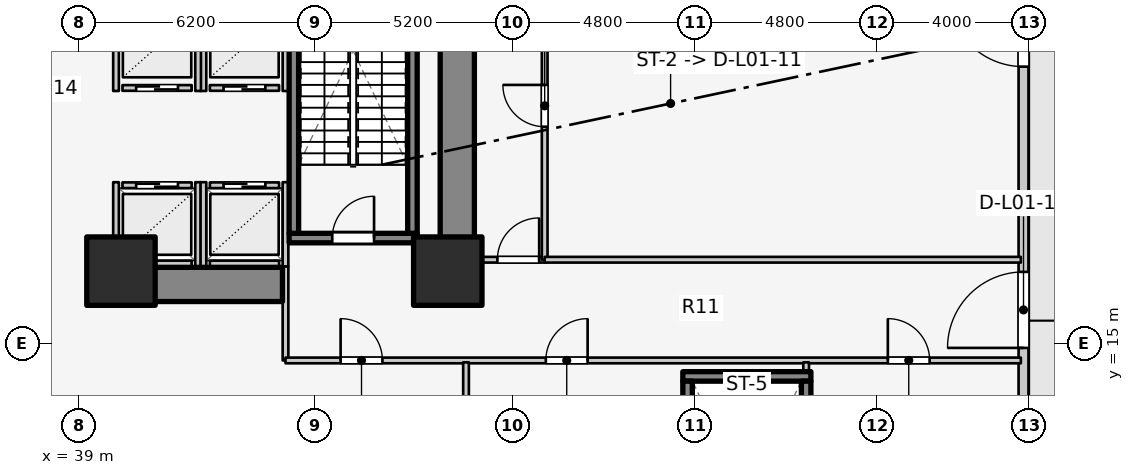
"""IFC4 building model, lengths in metres.
Left out: names, types, materials, properties, quantities, classifications, styles, units other than length and angle.
Written with IfcOpenShell. Run it as: python <this file> out.ifc"""

import sys

from ifc_helpers import new_model, si_unit, direction, frame, frame_2d, origin, origin_2d, place, context, subcontext, project, spatial, rectangle, extrude, element, fill, save


model = new_model("IFC4")
c1 = context("Model", 3, precision=1e-05, world=origin(), true_north=direction((0.0, 1.0)))
c2 = subcontext(c1, "Body", "Model", "MODEL_VIEW")
j1 = project(units=[si_unit("LENGTHUNIT", "METRE"), si_unit("PLANEANGLEUNIT", "RADIAN")], contexts=[c1])
p1 = place(None, origin())
s1 = spatial("IfcSite", under=j1, at=p1, CompositionType="ELEMENT")
p2 = place(p1, origin())
s2 = spatial("IfcBuilding", under=s1, at=p2, CompositionType="ELEMENT")
p3 = place(p2, origin())
s3 = spatial("IfcBuildingStorey", under=s2, at=p3, CompositionType="ELEMENT", Elevation=0.0)
p4 = place(p3, frame((48.95, 17.05, 0.0), z_axis=(0.0, 0.0, 1.0), x_axis=(0.0, 1.0, 0.0)))
e1 = element("IfcWall", 1, at=p4, inside=s3, PredefinedType="SHEAR", context=c2, shape_type="SweptSolid", body=[
    extrude(rectangle(XDim=12.8, YDim=0.9, at=frame_2d((6.4, 0.0))), origin(), (0.0, 0.0, 1.0), 4.6),
])
p5 = place(p3, frame((39.85, 16.55, 0.0), z_axis=(0.0, 0.0, 1.0), x_axis=(1.0, 0.0, 0.0)))
e2 = element("IfcWall", 2, at=p5, inside=s3, PredefinedType="SHEAR", context=c2, shape_type="SweptSolid", body=[
    extrude(rectangle(XDim=4.5, YDim=0.9, at=frame_2d((2.25, 0.0))), origin(), (0.0, 0.0, 1.0), 4.6),
])
p6 = place(p3, frame((44.525, 17.77, 0.0), z_axis=(0.0, 0.0, 1.0), x_axis=(1.0, 0.0, 0.0)))
e3 = element("IfcWall", 3, at=p6, inside=s3, PredefinedType="SOLIDWALL", context=c2, shape_type="SweptSolid", body=[
    extrude(rectangle(XDim=3.37, YDim=0.25, at=frame_2d((1.685, 0.0))), origin(), (0.0, 0.0, 1.0), 4.6),
])
p7 = place(p6, frame((1.135, 0.0, 0.0)))
e4 = element("IfcOpeningElement", 4, at=p7, cuts=e3, PredefinedType="OPENING", context=c2, shape_type="SweptSolid", body=[
    extrude(rectangle(XDim=1.1, YDim=2.1, at=frame_2d((0.55, 1.05))), frame((0.0, 0.135, 0.0), z_axis=(0.0, -1.0, 0.0), x_axis=(1.0, 0.0, 0.0)), (0.0, 0.0, 1.0), 0.27),
])
for number, where, z_axis, x_axis in (
    (5, (44.65, 17.895, 0.0), (0.0, 0.0, 1.0), (0.0, 1.0, 0.0)),
    (6, (47.77, 17.895, 0.0), (0.0, 0.0, 1.0), (0.0, 1.0, 0.0)),
):
    element("IfcWall", number, at=place(p3, frame(where, z_axis=z_axis, x_axis=x_axis)), inside=s3, PredefinedType="SOLIDWALL", context=c2, shape_type="SweptSolid", body=[
        extrude(rectangle(XDim=7.81, YDim=0.25, at=frame_2d((3.905, 0.0))), origin(), (0.0, 0.0, 1.0), 4.6),
    ])
p8 = place(p3, frame((54.885, 14.13, 0.0), z_axis=(0.0, 0.0, 1.0), x_axis=(1.0, 0.0, 0.0)))
e7 = element("IfcWall", 7, at=p8, inside=s3, PredefinedType="SOLIDWALL", context=c2, shape_type="SweptSolid", body=[
    extrude(rectangle(XDim=3.37, YDim=0.25, at=frame_2d((1.685, 0.0))), origin(), (0.0, 0.0, 1.0), 4.6),
])
for number, where, z_axis, x_axis in (
    (8, (55.01, 6.195, 0.0), (0.0, 0.0, 1.0), (0.0, 1.0, 0.0)),
    (9, (58.13, 6.195, 0.0), (0.0, 0.0, 1.0), (0.0, 1.0, 0.0)),
):
    element("IfcWall", number, at=place(p3, frame(where, z_axis=z_axis, x_axis=x_axis)), inside=s3, PredefinedType="SOLIDWALL", context=c2, shape_type="SweptSolid", body=[
        extrude(rectangle(XDim=7.81, YDim=0.25, at=frame_2d((3.905, 0.0))), origin(), (0.0, 0.0, 1.0), 4.6),
    ])
for number, where, z_axis, x_axis in (
    (10, (40.1, 16.9, 0.0), (0.0, 0.0, 1.0), (1.0, 0.0, 0.0)),
    (11, (48.7, 16.9, 0.0), (0.0, 0.0, 1.0), (1.0, 0.0, 0.0)),
):
    element("IfcColumn", number, at=place(p3, frame(where, z_axis=z_axis, x_axis=x_axis)), inside=s3, PredefinedType="COLUMN", context=c2, shape_type="SweptSolid", body=[
        extrude(rectangle(XDim=1.8, YDim=1.8, at=origin_2d()), origin(), (0.0, 0.0, 1.0), 4.6),
    ])
p9 = place(p3, frame((63.85, 0.28, 0.0), z_axis=(0.0, 0.0, 1.0), x_axis=(0.0, 1.0, 0.0)))
e12 = element("IfcWall", 12, at=p9, inside=s3, PredefinedType="STANDARD", context=c2, shape_type="SweptSolid", body=[
    extrude(rectangle(XDim=45.44, YDim=0.26, at=frame_2d((22.72, 0.0))), origin(), (0.0, 0.0, 1.0), 4.28),
])
p10 = place(p9, frame((14.6, 0.0, 0.0)))
e13 = element("IfcOpeningElement", 13, at=p10, cuts=e12, PredefinedType="OPENING", context=c2, shape_type="SweptSolid", body=[
    extrude(rectangle(XDim=2.0, YDim=2.4, at=frame_2d((1.0, 1.2))), frame((0.0, 0.14, 0.0), z_axis=(0.0, -1.0, 0.0), x_axis=(1.0, 0.0, 0.0)), (0.0, 0.0, 1.0), 0.28),
])
p11 = place(p9, frame((22.0, 0.0, 0.0)))
e14 = element("IfcOpeningElement", 14, at=p11, cuts=e12, PredefinedType="OPENING", context=c2, shape_type="SweptSolid", body=[
    extrude(rectangle(XDim=2.0, YDim=2.4, at=frame_2d((1.0, 1.2))), frame((0.0, 0.14, 0.0), z_axis=(0.0, -1.0, 0.0), x_axis=(1.0, 0.0, 0.0)), (0.0, 0.0, 1.0), 0.28),
])
p12 = place(p9, frame((35.92, 0.0, 0.0)))
e15 = element("IfcOpeningElement", 15, at=p12, cuts=e12, PredefinedType="OPENING", context=c2, shape_type="SweptSolid", body=[
    extrude(rectangle(XDim=4.2, YDim=3.0, at=frame_2d((2.1, 1.5))), frame((0.0, 0.14, 0.0), z_axis=(0.0, -1.0, 0.0), x_axis=(1.0, 0.0, 0.0)), (0.0, 0.0, 1.0), 0.28),
])
p13 = place(p3, frame((40.14, 19.16, 0.0), z_axis=(0.0, 0.0, 1.0), x_axis=(1.0, 0.0, 0.0)))
e16 = element("IfcWall", 16, at=p13, inside=s3, PredefinedType="SOLIDWALL", context=c2, shape_type="SweptSolid", body=[
    extrude(rectangle(XDim=1.82, YDim=0.15, at=frame_2d((0.91, 0.0))), origin(), (0.0, 0.0, 1.0), 3.62),
])
p14 = place(p13, frame((0.36, 0.0, 0.0)))
e17 = element("IfcOpeningElement", 17, at=p14, cuts=e16, PredefinedType="OPENING", context=c2, shape_type="SweptSolid", body=[
    extrude(rectangle(XDim=1.1, YDim=2.1, at=frame_2d((0.55, 1.05))), frame((0.0, 0.085, 0.0), z_axis=(0.0, -1.0, 0.0), x_axis=(1.0, 0.0, 0.0)), (0.0, 0.0, 1.0), 0.17),
])
p15 = place(p3, frame((40.14, 17.1, 0.0), z_axis=(0.0, 0.0, 1.0), x_axis=(1.0, 0.0, 0.0)))
e18 = element("IfcWall", 18, at=p15, inside=s3, PredefinedType="SOLIDWALL", context=c2, shape_type="SweptSolid", body=[
    extrude(rectangle(XDim=1.82, YDim=0.15, at=frame_2d((0.91, 0.0))), origin(), (0.0, 0.0, 1.0), 3.62),
])
p16 = place(p3, frame((39.97, 17.02, 0.0), z_axis=(0.0, 0.0, 1.0), x_axis=(0.0, 1.0, 0.0)))
e19 = element("IfcWall", 19, at=p16, inside=s3, PredefinedType="SOLIDWALL", context=c2, shape_type="SweptSolid", body=[
    extrude(rectangle(XDim=2.22, YDim=0.15, at=frame_2d((1.11, 0.0))), origin(), (0.0, 0.0, 1.0), 3.3),
])
p17 = place(p3, frame((42.13, 17.02, 0.0), z_axis=(0.0, 0.0, 1.0), x_axis=(0.0, 1.0, 0.0)))
e20 = element("IfcWall", 20, at=p17, inside=s3, PredefinedType="SOLIDWALL", context=c2, shape_type="SweptSolid", body=[
    extrude(rectangle(XDim=2.22, YDim=0.15, at=frame_2d((1.11, 0.0))), origin(), (0.0, 0.0, 1.0), 4.255),
])
p18 = place(p3, frame((42.44, 19.16, 0.0), z_axis=(0.0, 0.0, 1.0), x_axis=(1.0, 0.0, 0.0)))
e21 = element("IfcWall", 21, at=p18, inside=s3, PredefinedType="SOLIDWALL", context=c2, shape_type="SweptSolid", body=[
    extrude(rectangle(XDim=1.82, YDim=0.15, at=frame_2d((0.91, 0.0))), origin(), (0.0, 0.0, 1.0), 4.255),
])
p19 = place(p18, frame((0.36, 0.0, 0.0)))
e22 = element("IfcOpeningElement", 22, at=p19, cuts=e21, PredefinedType="OPENING", context=c2, shape_type="SweptSolid", body=[
    extrude(rectangle(XDim=1.1, YDim=2.1, at=frame_2d((0.55, 1.05))), frame((0.0, 0.085, 0.0), z_axis=(0.0, -1.0, 0.0), x_axis=(1.0, 0.0, 0.0)), (0.0, 0.0, 1.0), 0.17),
])
p20 = place(p3, frame((42.44, 17.1, 0.0), z_axis=(0.0, 0.0, 1.0), x_axis=(1.0, 0.0, 0.0)))
e23 = element("IfcWall", 23, at=p20, inside=s3, PredefinedType="SOLIDWALL", context=c2, shape_type="SweptSolid", body=[
    extrude(rectangle(XDim=1.82, YDim=0.15, at=frame_2d((0.91, 0.0))), origin(), (0.0, 0.0, 1.0), 4.255),
])
p21 = place(p3, frame((42.27, 17.02, 0.0), z_axis=(0.0, 0.0, 1.0), x_axis=(0.0, 1.0, 0.0)))
e24 = element("IfcWall", 24, at=p21, inside=s3, PredefinedType="SOLIDWALL", context=c2, shape_type="SweptSolid", body=[
    extrude(rectangle(XDim=2.22, YDim=0.15, at=frame_2d((1.11, 0.0))), origin(), (0.0, 0.0, 1.0), 4.255),
])
p22 = place(p3, frame((44.43, 17.02, 0.0), z_axis=(0.0, 0.0, 1.0), x_axis=(0.0, 1.0, 0.0)))
e25 = element("IfcWall", 25, at=p22, inside=s3, PredefinedType="SOLIDWALL", context=c2, shape_type="SweptSolid", body=[
    extrude(rectangle(XDim=2.22, YDim=0.15, at=frame_2d((1.11, 0.0))), origin(), (0.0, 0.0, 1.0), 3.62),
])
p23 = place(p3, frame((42.44, 21.72, 0.0), z_axis=(0.0, 0.0, 1.0), x_axis=(1.0, 0.0, 0.0)))
e26 = element("IfcWall", 26, at=p23, inside=s3, PredefinedType="SOLIDWALL", context=c2, shape_type="SweptSolid", body=[
    extrude(rectangle(XDim=1.82, YDim=0.15, at=frame_2d((0.91, 0.0))), origin(), (0.0, 0.0, 1.0), 4.255),
])
p24 = place(p23, frame((0.36, 0.0, 0.0)))
e27 = element("IfcOpeningElement", 27, at=p24, cuts=e26, PredefinedType="OPENING", context=c2, shape_type="SweptSolid", body=[
    extrude(rectangle(XDim=1.1, YDim=2.1, at=frame_2d((0.55, 1.05))), frame((0.0, 0.085, 0.0), z_axis=(0.0, -1.0, 0.0), x_axis=(1.0, 0.0, 0.0)), (0.0, 0.0, 1.0), 0.17),
])
for number, where, z_axis, x_axis in (
    (28, (42.27, 21.64, 0.0), (0.0, 0.0, 1.0), (0.0, 1.0, 0.0)),
    (29, (44.43, 21.64, 0.0), (0.0, 0.0, 1.0), (0.0, 1.0, 0.0)),
):
    element("IfcWall", number, at=place(p3, frame(where, z_axis=z_axis, x_axis=x_axis)), inside=s3, PredefinedType="SOLIDWALL", context=c2, shape_type="SweptSolid", body=[
        extrude(rectangle(XDim=2.32, YDim=0.15, at=frame_2d((1.16, 0.0))), origin(), (0.0, 0.0, 1.0), 4.255),
    ])
p25 = place(p3, frame((40.14, 21.72, 0.0), z_axis=(0.0, 0.0, 1.0), x_axis=(1.0, 0.0, 0.0)))
e30 = element("IfcWall", 30, at=p25, inside=s3, PredefinedType="SOLIDWALL", context=c2, shape_type="SweptSolid", body=[
    extrude(rectangle(XDim=1.82, YDim=0.15, at=frame_2d((0.91, 0.0))), origin(), (0.0, 0.0, 1.0), 3.62),
])
p26 = place(p25, frame((0.36, 0.0, 0.0)))
e31 = element("IfcOpeningElement", 31, at=p26, cuts=e30, PredefinedType="OPENING", context=c2, shape_type="SweptSolid", body=[
    extrude(rectangle(XDim=1.1, YDim=2.1, at=frame_2d((0.55, 1.05))), frame((0.0, 0.085, 0.0), z_axis=(0.0, -1.0, 0.0), x_axis=(1.0, 0.0, 0.0)), (0.0, 0.0, 1.0), 0.17),
])
p27 = place(p3, frame((39.97, 21.64, 0.0), z_axis=(0.0, 0.0, 1.0), x_axis=(0.0, 1.0, 0.0)))
e32 = element("IfcWall", 32, at=p27, inside=s3, PredefinedType="SOLIDWALL", context=c2, shape_type="SweptSolid", body=[
    extrude(rectangle(XDim=2.32, YDim=0.15, at=frame_2d((1.16, 0.0))), origin(), (0.0, 0.0, 1.0), 3.62),
])
p28 = place(p3, frame((42.13, 21.64, 0.0), z_axis=(0.0, 0.0, 1.0), x_axis=(0.0, 1.0, 0.0)))
e33 = element("IfcWall", 33, at=p28, inside=s3, PredefinedType="SOLIDWALL", context=c2, shape_type="SweptSolid", body=[
    extrude(rectangle(XDim=2.32, YDim=0.15, at=frame_2d((1.16, 0.0))), origin(), (0.0, 0.0, 1.0), 4.255),
])
p29 = place(p3, frame((44.43, 14.55, 0.0), z_axis=(0.0, 0.0, 1.0), x_axis=(0.0, 1.0, 0.0)))
e34 = element("IfcWall", 34, at=p29, inside=s3, PredefinedType="PARTITIONING", context=c2, shape_type="SweptSolid", body=[
    extrude(rectangle(XDim=2.47, YDim=0.15, at=frame_2d((1.235, 0.0))), origin(), (0.0, 0.0, 1.0), 4.255),
])
p30 = place(p3, frame((44.43, 14.55, 0.0), z_axis=(0.0, 0.0, 1.0), x_axis=(1.0, 0.0, 0.0)))
e35 = element("IfcWall", 35, at=p30, inside=s3, PredefinedType="PARTITIONING", context=c2, shape_type="SweptSolid", body=[
    extrude(rectangle(XDim=19.35, YDim=0.15, at=frame_2d((9.675, 0.0))), origin(), (0.0, 0.0, 1.0), 3.3),
])
p31 = place(p30, frame((1.45, 0.0, 0.0)))
e36 = element("IfcOpeningElement", 36, at=p31, cuts=e35, PredefinedType="OPENING", context=c2, shape_type="SweptSolid", body=[
    extrude(rectangle(XDim=1.1, YDim=2.1, at=frame_2d((0.55, 1.05))), frame((0.0, 0.085, 0.0), z_axis=(0.0, -1.0, 0.0), x_axis=(1.0, 0.0, 0.0)), (0.0, 0.0, 1.0), 0.17),
])
p32 = place(p30, frame((6.85, 0.0, 0.0)))
e37 = element("IfcOpeningElement", 37, at=p32, cuts=e35, PredefinedType="OPENING", context=c2, shape_type="SweptSolid", body=[
    extrude(rectangle(XDim=1.1, YDim=2.1, at=frame_2d((0.55, 1.05))), frame((0.0, 0.085, 0.0), z_axis=(0.0, -1.0, 0.0), x_axis=(1.0, 0.0, 0.0)), (0.0, 0.0, 1.0), 0.17),
])
p33 = place(p30, frame((15.85, 0.0, 0.0)))
e38 = element("IfcOpeningElement", 38, at=p33, cuts=e35, PredefinedType="OPENING", context=c2, shape_type="SweptSolid", body=[
    extrude(rectangle(XDim=1.1, YDim=2.1, at=frame_2d((0.55, 1.05))), frame((0.0, 0.085, 0.0), z_axis=(0.0, -1.0, 0.0), x_axis=(1.0, 0.0, 0.0)), (0.0, 0.0, 1.0), 0.17),
])
p34 = place(p3, frame((48.95, 17.2, 0.0), z_axis=(0.0, 0.0, 1.0), x_axis=(1.0, 0.0, 0.0)))
e39 = element("IfcWall", 39, at=p34, inside=s3, PredefinedType="PARTITIONING", context=c2, shape_type="SweptSolid", body=[
    extrude(rectangle(XDim=2.33, YDim=0.15, at=frame_2d((1.165, 0.0))), origin(), (0.0, 0.0, 1.0), 4.255),
])
p35 = place(p34, frame((1.055, 0.0, 0.0)))
e40 = element("IfcOpeningElement", 40, at=p35, cuts=e39, PredefinedType="OPENING", context=c2, shape_type="SweptSolid", body=[
    extrude(rectangle(XDim=1.1, YDim=2.1, at=frame_2d((0.55, 1.05))), frame((0.0, 0.085, 0.0), z_axis=(0.0, -1.0, 0.0), x_axis=(1.0, 0.0, 0.0)), (0.0, 0.0, 1.0), 0.17),
])
p36 = place(p3, frame((49.18, 0.22, 0.0), z_axis=(0.0, 0.0, 1.0), x_axis=(0.0, 1.0, 0.0)))
e41 = element("IfcWall", 41, at=p36, inside=s3, PredefinedType="PARTITIONING", context=c2, shape_type="SweptSolid", body=[
    extrude(rectangle(XDim=14.28, YDim=0.15, at=frame_2d((7.14, 0.0))), origin(), (0.0, 0.0, 1.0), 3.3),
])
p37 = place(p3, frame((58.13, 14.24, 0.0), z_axis=(0.0, 0.0, 1.0), x_axis=(0.0, 1.0, 0.0)))
e42 = element("IfcWall", 42, at=p37, inside=s3, PredefinedType="PARTITIONING", context=c2, shape_type="SweptSolid", body=[
    extrude(rectangle(XDim=0.26, YDim=0.15, at=frame_2d((0.13, 0.0))), origin(), (0.0, 0.0, 1.0), 4.255),
])
p38 = place(p3, frame((51.25, 17.2, 0.0), z_axis=(0.0, 0.0, 1.0), x_axis=(0.0, 1.0, 0.0)))
e43 = element("IfcWall", 43, at=p38, inside=s3, PredefinedType="PARTITIONING", context=c2, shape_type="SweptSolid", body=[
    extrude(rectangle(XDim=18.55, YDim=0.15, at=frame_2d((9.275, 0.0))), origin(), (0.0, 0.0, 1.0), 3.3),
])
p39 = place(p38, frame((3.5, 0.0, 0.0)))
e44 = element("IfcOpeningElement", 44, at=p39, cuts=e43, PredefinedType="OPENING", context=c2, shape_type="SweptSolid", body=[
    extrude(rectangle(XDim=1.1, YDim=2.1, at=frame_2d((0.55, 1.05))), frame((0.0, 0.085, 0.0), z_axis=(0.0, -1.0, 0.0), x_axis=(1.0, 0.0, 0.0)), (0.0, 0.0, 1.0), 0.17),
])
p40 = place(p3, frame((51.25, 17.2, 0.0), z_axis=(0.0, 0.0, 1.0), x_axis=(1.0, 0.0, 0.0)))
e45 = element("IfcWall", 45, at=p40, inside=s3, PredefinedType="PARTITIONING", context=c2, shape_type="SweptSolid", body=[
    extrude(rectangle(XDim=12.53, YDim=0.15, at=frame_2d((6.265, 0.0))), origin(), (0.0, 0.0, 1.0), 3.3),
])
p41 = place(p10, frame((2.0, 0.0, 0.0), z_axis=(0.0, 0.0, 1.0), x_axis=(-1.0, 0.0, 0.0)))
e46 = element("IfcDoor", 46, at=p41, inside=s3, OperationType="SINGLE_SWING_LEFT", PredefinedType="DOOR", context=c2, shape_type="SweptSolid", body=[
    extrude(rectangle(XDim=2.0, YDim=2.4, at=frame_2d((1.0, 1.2))), frame((0.0, 0.025, 0.0), z_axis=(0.0, -1.0, 0.0), x_axis=(1.0, 0.0, 0.0)), (0.0, 0.0, 1.0), 0.05),
])
fill(e13, e46)
p42 = place(p11, frame((2.0, 0.0, 0.0), z_axis=(0.0, 0.0, 1.0), x_axis=(-1.0, 0.0, 0.0)))
e47 = element("IfcDoor", 47, at=p42, inside=s3, OperationType="SINGLE_SWING_RIGHT", PredefinedType="DOOR", context=c2, shape_type="SweptSolid", body=[
    extrude(rectangle(XDim=2.0, YDim=2.4, at=frame_2d((1.0, 1.2))), frame((0.0, 0.025, 0.0), z_axis=(0.0, -1.0, 0.0), x_axis=(1.0, 0.0, 0.0)), (0.0, 0.0, 1.0), 0.05),
])
fill(e14, e47)
p43 = place(p7, origin())
e48 = element("IfcDoor", 48, at=p43, inside=s3, OperationType="SINGLE_SWING_RIGHT", PredefinedType="DOOR", context=c2, shape_type="SweptSolid", body=[
    extrude(rectangle(XDim=1.1, YDim=2.1, at=frame_2d((0.55, 1.05))), frame((0.0, 0.025, 0.0), z_axis=(0.0, -1.0, 0.0), x_axis=(1.0, 0.0, 0.0)), (0.0, 0.0, 1.0), 0.05),
])
fill(e4, e48)
p44 = place(p14, origin())
e49 = element("IfcDoor", 49, at=p44, inside=s3, OperationType="DOUBLE_DOOR_SLIDING", PredefinedType="DOOR", context=c2, shape_type="SweptSolid", body=[
    extrude(rectangle(XDim=1.1, YDim=2.1, at=frame_2d((0.55, 1.05))), frame((0.0, 0.025, 0.0), z_axis=(0.0, -1.0, 0.0), x_axis=(1.0, 0.0, 0.0)), (0.0, 0.0, 1.0), 0.05),
])
fill(e17, e49)
p45 = place(p19, origin())
e50 = element("IfcDoor", 50, at=p45, inside=s3, OperationType="DOUBLE_DOOR_SLIDING", PredefinedType="DOOR", context=c2, shape_type="SweptSolid", body=[
    extrude(rectangle(XDim=1.1, YDim=2.1, at=frame_2d((0.55, 1.05))), frame((0.0, 0.025, 0.0), z_axis=(0.0, -1.0, 0.0), x_axis=(1.0, 0.0, 0.0)), (0.0, 0.0, 1.0), 0.05),
])
fill(e22, e50)
p46 = place(p24, origin())
e51 = element("IfcDoor", 51, at=p46, inside=s3, OperationType="DOUBLE_DOOR_SLIDING", PredefinedType="DOOR", context=c2, shape_type="SweptSolid", body=[
    extrude(rectangle(XDim=1.1, YDim=2.1, at=frame_2d((0.55, 1.05))), frame((0.0, 0.025, 0.0), z_axis=(0.0, -1.0, 0.0), x_axis=(1.0, 0.0, 0.0)), (0.0, 0.0, 1.0), 0.05),
])
fill(e27, e51)
p47 = place(p26, origin())
e52 = element("IfcDoor", 52, at=p47, inside=s3, OperationType="DOUBLE_DOOR_SLIDING", PredefinedType="DOOR", context=c2, shape_type="SweptSolid", body=[
    extrude(rectangle(XDim=1.1, YDim=2.1, at=frame_2d((0.55, 1.05))), frame((0.0, 0.025, 0.0), z_axis=(0.0, -1.0, 0.0), x_axis=(1.0, 0.0, 0.0)), (0.0, 0.0, 1.0), 0.05),
])
fill(e31, e52)
p48 = place(p31, origin())
e53 = element("IfcDoor", 53, at=p48, inside=s3, OperationType="SINGLE_SWING_LEFT", PredefinedType="DOOR", context=c2, shape_type="SweptSolid", body=[
    extrude(rectangle(XDim=1.1, YDim=2.1, at=frame_2d((0.55, 1.05))), frame((0.0, 0.025, 0.0), z_axis=(0.0, -1.0, 0.0), x_axis=(1.0, 0.0, 0.0)), (0.0, 0.0, 1.0), 0.05),
])
fill(e36, e53)
p49 = place(p32, origin())
e54 = element("IfcDoor", 54, at=p49, inside=s3, OperationType="SINGLE_SWING_RIGHT", PredefinedType="DOOR", context=c2, shape_type="SweptSolid", body=[
    extrude(rectangle(XDim=1.1, YDim=2.1, at=frame_2d((0.55, 1.05))), frame((0.0, 0.025, 0.0), z_axis=(0.0, -1.0, 0.0), x_axis=(1.0, 0.0, 0.0)), (0.0, 0.0, 1.0), 0.05),
])
fill(e37, e54)
p50 = place(p33, origin())
e55 = element("IfcDoor", 55, at=p50, inside=s3, OperationType="SINGLE_SWING_LEFT", PredefinedType="DOOR", context=c2, shape_type="SweptSolid", body=[
    extrude(rectangle(XDim=1.1, YDim=2.1, at=frame_2d((0.55, 1.05))), frame((0.0, 0.025, 0.0), z_axis=(0.0, -1.0, 0.0), x_axis=(1.0, 0.0, 0.0)), (0.0, 0.0, 1.0), 0.05),
])
fill(e38, e55)
p51 = place(p35, origin())
e56 = element("IfcDoor", 56, at=p51, inside=s3, OperationType="SINGLE_SWING_RIGHT", PredefinedType="DOOR", context=c2, shape_type="SweptSolid", body=[
    extrude(rectangle(XDim=1.1, YDim=2.1, at=frame_2d((0.55, 1.05))), frame((0.0, 0.025, 0.0), z_axis=(0.0, -1.0, 0.0), x_axis=(1.0, 0.0, 0.0)), (0.0, 0.0, 1.0), 0.05),
])
fill(e40, e56)
p52 = place(p39, origin())
e57 = element("IfcDoor", 57, at=p52, inside=s3, OperationType="SINGLE_SWING_RIGHT", PredefinedType="DOOR", context=c2, shape_type="SweptSolid", body=[
    extrude(rectangle(XDim=1.1, YDim=2.1, at=frame_2d((0.55, 1.05))), frame((0.0, 0.025, 0.0), z_axis=(0.0, -1.0, 0.0), x_axis=(1.0, 0.0, 0.0)), (0.0, 0.0, 1.0), 0.05),
])
fill(e44, e57)
save(model, sys.argv[1])
